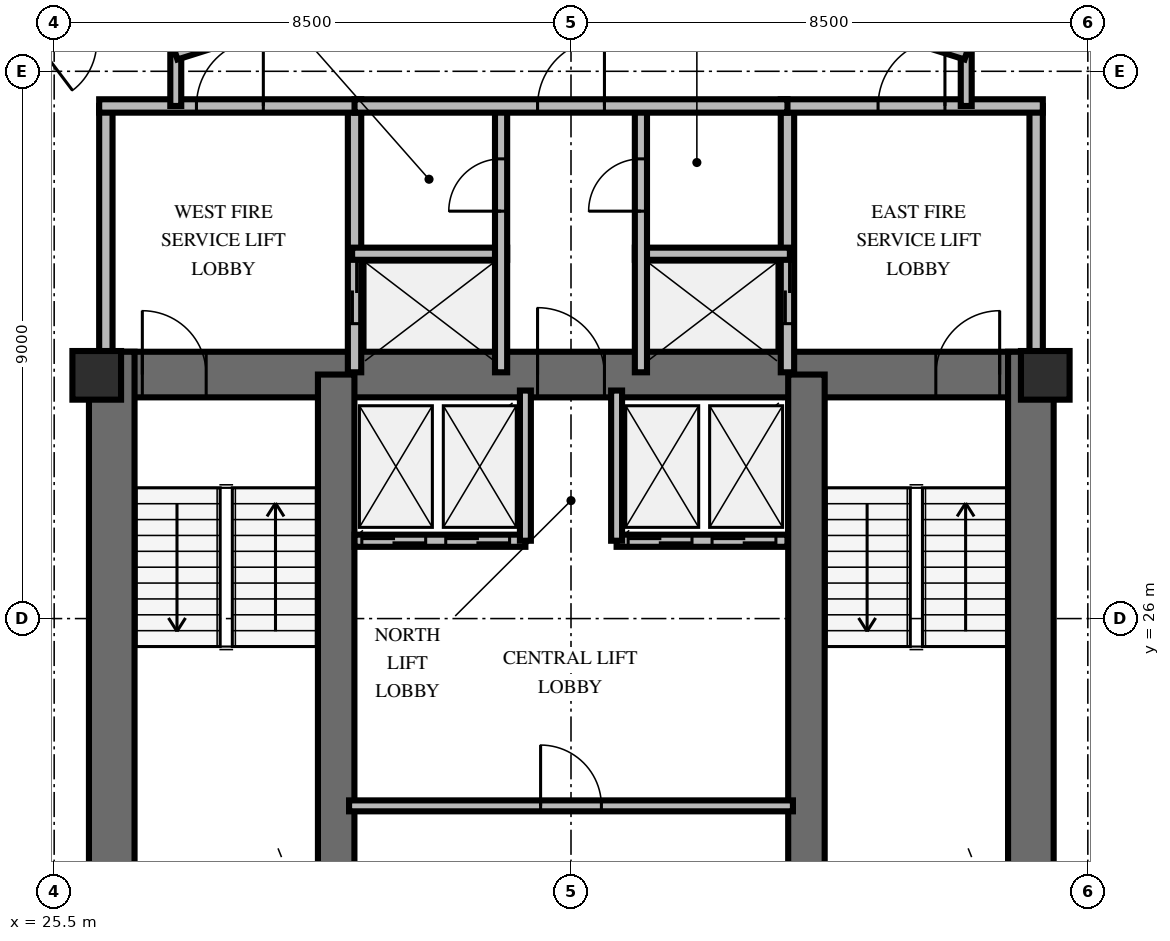
"""IFC4 building model, lengths in metres.
Left out: names, types, materials, properties, quantities, classifications, styles, units other than length and angle.
Written with IfcOpenShell. Run it as: python <this file> out.ifc"""

import sys

from ifc_helpers import new_model, si_unit, direction, frame, frame_2d, origin, origin_2d, place, context, subcontext, project, spatial, rectangle, extrude, element, fill, save


model = new_model("IFC4")
c1 = context("Model", 3, precision=1e-05, world=origin(), true_north=direction((0.0, 1.0)))
c2 = subcontext(c1, "Body", "Model", "MODEL_VIEW")
j1 = project(units=[si_unit("LENGTHUNIT", "METRE"), si_unit("PLANEANGLEUNIT", "RADIAN")], contexts=[c1])
p1 = place(None, origin())
s1 = spatial("IfcSite", under=j1, at=p1, CompositionType="ELEMENT")
p2 = place(p1, origin())
s2 = spatial("IfcBuilding", under=s1, at=p2, CompositionType="ELEMENT")
p3 = place(p2, frame((0.0, 0.0, 188.0)))
s3 = spatial("IfcBuildingStorey", under=s2, at=p3, CompositionType="ELEMENT", Elevation=188.0)
p4 = place(p3, frame((26.072, 30.013, 0.0), z_axis=(0.0, 0.0, 1.0), x_axis=(1.0, 0.0, 0.0)))
e1 = element("IfcWall", 1, at=p4, inside=s3, PredefinedType="SHEAR", context=c2, shape_type="SweptSolid", body=[
    extrude(rectangle(XDim=15.866, YDim=0.75, at=frame_2d((7.933, 0.0))), origin(), (0.0, 0.0, 1.0), 3.6),
])
p5 = place(p4, frame((0.878, 0.0, 0.0)))
e2 = element("IfcOpeningElement", 2, at=p5, cuts=e1, PredefinedType="OPENING", context=c2, shape_type="SweptSolid", body=[
    extrude(rectangle(XDim=1.05, YDim=2.15, at=frame_2d((0.525, 1.075))), frame((0.0, 0.385, 0.0), z_axis=(0.0, -1.0, 0.0), x_axis=(1.0, 0.0, 0.0)), (0.0, 0.0, 1.0), 0.77),
])
p6 = place(p4, frame((13.928, 0.0, 0.0)))
e3 = element("IfcOpeningElement", 3, at=p6, cuts=e1, PredefinedType="OPENING", context=c2, shape_type="SweptSolid", body=[
    extrude(rectangle(XDim=1.05, YDim=2.15, at=frame_2d((0.525, 1.075))), frame((0.0, 0.385, 0.0), z_axis=(0.0, -1.0, 0.0), x_axis=(1.0, 0.0, 0.0)), (0.0, 0.0, 1.0), 0.77),
])
p7 = place(p4, frame((7.378, 0.0, 0.0)))
e4 = element("IfcOpeningElement", 4, at=p7, cuts=e1, PredefinedType="OPENING", context=c2, shape_type="SweptSolid", body=[
    extrude(rectangle(XDim=1.1, YDim=2.15, at=frame_2d((0.55, 1.075))), frame((0.0, 0.385, 0.0), z_axis=(0.0, -1.0, 0.0), x_axis=(1.0, 0.0, 0.0)), (0.0, 0.0, 1.0), 0.77),
])
for number, where, z_axis, x_axis in (
    (5, (26.447, 19.812, 0.0), (0.0, 0.0, 1.0), (0.0, 1.0, 0.0)),
    (6, (41.563, 19.812, 0.0), (0.0, 0.0, 1.0), (0.0, 1.0, 0.0)),
):
    element("IfcWall", number, at=place(p3, frame(where, z_axis=z_axis, x_axis=x_axis)), inside=s3, PredefinedType="SHEAR", context=c2, shape_type="SweptSolid", body=[
        extrude(rectangle(XDim=10.576, YDim=0.75, at=frame_2d((5.288, 0.0))), origin(), (0.0, 0.0, 1.0), 3.6),
    ])
for number, where, z_axis, x_axis in (
    (7, (30.138, 20.187, 0.0), (0.0, 0.0, 1.0), (0.0, 1.0, 0.0)),
    (8, (37.872, 20.187, 0.0), (0.0, 0.0, 1.0), (0.0, 1.0, 0.0)),
):
    element("IfcWall", number, at=place(p3, frame(where, z_axis=z_axis, x_axis=x_axis)), inside=s3, PredefinedType="SHEAR", context=c2, shape_type="SweptSolid", body=[
        extrude(rectangle(XDim=9.826, YDim=0.6, at=frame_2d((4.913, 0.0))), origin(), (0.0, 0.0, 1.0), 3.6),
    ])
for number, where, z_axis, x_axis in (
    (9, (26.2, 30.0, 0.0), (0.0, 0.0, 1.0), (1.0, 0.0, 0.0)),
    (10, (41.8, 30.0, 0.0), (0.0, 0.0, 1.0), (1.0, 0.0, 0.0)),
):
    element("IfcColumn", number, at=place(p3, frame(where, z_axis=z_axis, x_axis=x_axis)), inside=s3, PredefinedType="PILASTER", context=c2, shape_type="SweptSolid", body=[
        extrude(rectangle(XDim=0.8, YDim=0.8, at=origin_2d()), origin(), (0.0, 0.0, 1.0), 3.6),
    ])
p8 = place(p3, frame((26.35, 30.05, 0.0), z_axis=(0.0, 0.0, 1.0), x_axis=(0.0, 1.0, 0.0)))
e11 = element("IfcWall", 11, at=p8, inside=s3, PredefinedType="SOLIDWALL", context=c2, shape_type="SweptSolid", body=[
    extrude(rectangle(XDim=4.38, YDim=0.22, at=frame_2d((2.19, 0.0))), origin(), (0.0, 0.0, 1.0), 2.46),
])
p9 = place(p3, frame((30.44, 30.05, 0.0), z_axis=(0.0, 0.0, 1.0), x_axis=(0.0, 1.0, 0.0)))
e12 = element("IfcWall", 12, at=p9, inside=s3, PredefinedType="SOLIDWALL", context=c2, shape_type="SweptSolid", body=[
    extrude(rectangle(XDim=4.38, YDim=0.22, at=frame_2d((2.19, 0.0))), origin(), (0.0, 0.0, 1.0), 2.46),
])
p10 = place(p9, frame((0.8, 0.0, 0.0)))
e13 = element("IfcOpeningElement", 13, at=p10, cuts=e12, PredefinedType="OPENING", context=c2, shape_type="SweptSolid", body=[
    extrude(rectangle(XDim=1.05, YDim=2.1, at=frame_2d((0.525, 1.05))), frame((0.0, 0.12, 0.0), z_axis=(0.0, -1.0, 0.0), x_axis=(1.0, 0.0, 0.0)), (0.0, 0.0, 1.0), 0.24),
])
p11 = place(p3, frame((26.24, 34.43, 0.0), z_axis=(0.0, 0.0, 1.0), x_axis=(1.0, 0.0, 0.0)))
e14 = element("IfcWall", 14, at=p11, inside=s3, PredefinedType="SOLIDWALL", context=c2, shape_type="SweptSolid", body=[
    extrude(rectangle(XDim=4.31, YDim=0.22, at=frame_2d((2.155, 0.0))), origin(), (0.0, 0.0, 1.0), 2.46),
])
p12 = place(p11, frame((1.6, 0.0, 0.0)))
e15 = element("IfcOpeningElement", 15, at=p12, cuts=e14, PredefinedType="OPENING", context=c2, shape_type="SweptSolid", body=[
    extrude(rectangle(XDim=1.1, YDim=2.15, at=frame_2d((0.55, 1.075))), frame((0.0, 0.12, 0.0), z_axis=(0.0, -1.0, 0.0), x_axis=(1.0, 0.0, 0.0)), (0.0, 0.0, 1.0), 0.24),
])
p13 = place(p3, frame((30.4, 32.0, 0.0), z_axis=(0.0, 0.0, 1.0), x_axis=(1.0, 0.0, 0.0)))
e16 = element("IfcWall", 16, at=p13, inside=s3, PredefinedType="SOLIDWALL", context=c2, shape_type="SweptSolid", body=[
    extrude(rectangle(XDim=2.55, YDim=0.2, at=frame_2d((1.275, 0.0))), origin(), (0.0, 0.0, 1.0), 2.46),
])
p14 = place(p3, frame((32.85, 30.05, 0.0), z_axis=(0.0, 0.0, 1.0), x_axis=(0.0, 1.0, 0.0)))
e17 = element("IfcWall", 17, at=p14, inside=s3, PredefinedType="SOLIDWALL", context=c2, shape_type="SweptSolid", body=[
    extrude(rectangle(XDim=4.38, YDim=0.2, at=frame_2d((2.19, 0.0))), origin(), (0.0, 0.0, 1.0), 2.46),
])
p15 = place(p14, frame((2.65, 0.0, 0.0)))
e18 = element("IfcOpeningElement", 18, at=p15, cuts=e17, PredefinedType="OPENING", context=c2, shape_type="SweptSolid", body=[
    extrude(rectangle(XDim=0.86, YDim=2.05, at=frame_2d((0.43, 1.025))), frame((0.0, 0.11, 0.0), z_axis=(0.0, -1.0, 0.0), x_axis=(1.0, 0.0, 0.0)), (0.0, 0.0, 1.0), 0.22),
])
p16 = place(p3, frame((37.56, 30.05, 0.0), z_axis=(0.0, 0.0, 1.0), x_axis=(0.0, 1.0, 0.0)))
e19 = element("IfcWall", 19, at=p16, inside=s3, PredefinedType="SOLIDWALL", context=c2, shape_type="SweptSolid", body=[
    extrude(rectangle(XDim=4.38, YDim=0.22, at=frame_2d((2.19, 0.0))), origin(), (0.0, 0.0, 1.0), 2.46),
])
p17 = place(p16, frame((0.8, 0.0, 0.0)))
e20 = element("IfcOpeningElement", 20, at=p17, cuts=e19, PredefinedType="OPENING", context=c2, shape_type="SweptSolid", body=[
    extrude(rectangle(XDim=1.05, YDim=2.1, at=frame_2d((0.525, 1.05))), frame((0.0, 0.12, 0.0), z_axis=(0.0, -1.0, 0.0), x_axis=(1.0, 0.0, 0.0)), (0.0, 0.0, 1.0), 0.24),
])
p18 = place(p3, frame((41.65, 30.05, 0.0), z_axis=(0.0, 0.0, 1.0), x_axis=(0.0, 1.0, 0.0)))
e21 = element("IfcWall", 21, at=p18, inside=s3, PredefinedType="SOLIDWALL", context=c2, shape_type="SweptSolid", body=[
    extrude(rectangle(XDim=4.38, YDim=0.22, at=frame_2d((2.19, 0.0))), origin(), (0.0, 0.0, 1.0), 2.46),
])
p19 = place(p3, frame((37.45, 34.43, 0.0), z_axis=(0.0, 0.0, 1.0), x_axis=(1.0, 0.0, 0.0)))
e22 = element("IfcWall", 22, at=p19, inside=s3, PredefinedType="SOLIDWALL", context=c2, shape_type="SweptSolid", body=[
    extrude(rectangle(XDim=4.31, YDim=0.22, at=frame_2d((2.155, 0.0))), origin(), (0.0, 0.0, 1.0), 2.46),
])
p20 = place(p19, frame((1.6, 0.0, 0.0)))
e23 = element("IfcOpeningElement", 23, at=p20, cuts=e22, PredefinedType="OPENING", context=c2, shape_type="SweptSolid", body=[
    extrude(rectangle(XDim=1.1, YDim=2.15, at=frame_2d((0.55, 1.075))), frame((0.0, 0.12, 0.0), z_axis=(0.0, -1.0, 0.0), x_axis=(1.0, 0.0, 0.0)), (0.0, 0.0, 1.0), 0.24),
])
p21 = place(p3, frame((35.05, 32.0, 0.0), z_axis=(0.0, 0.0, 1.0), x_axis=(1.0, 0.0, 0.0)))
e24 = element("IfcWall", 24, at=p21, inside=s3, PredefinedType="SOLIDWALL", context=c2, shape_type="SweptSolid", body=[
    extrude(rectangle(XDim=2.55, YDim=0.2, at=frame_2d((1.275, 0.0))), origin(), (0.0, 0.0, 1.0), 2.46),
])
p22 = place(p3, frame((35.15, 30.05, 0.0), z_axis=(0.0, 0.0, 1.0), x_axis=(0.0, 1.0, 0.0)))
e25 = element("IfcWall", 25, at=p22, inside=s3, PredefinedType="SOLIDWALL", context=c2, shape_type="SweptSolid", body=[
    extrude(rectangle(XDim=4.38, YDim=0.2, at=frame_2d((2.19, 0.0))), origin(), (0.0, 0.0, 1.0), 2.46),
])
p23 = place(p22, frame((2.65, 0.0, 0.0)))
e26 = element("IfcOpeningElement", 26, at=p23, cuts=e25, PredefinedType="OPENING", context=c2, shape_type="SweptSolid", body=[
    extrude(rectangle(XDim=0.86, YDim=2.05, at=frame_2d((0.43, 1.025))), frame((0.0, 0.11, 0.0), z_axis=(0.0, -1.0, 0.0), x_axis=(1.0, 0.0, 0.0)), (0.0, 0.0, 1.0), 0.22),
])
p24 = place(p3, frame((30.44, 34.43, 0.0), z_axis=(0.0, 0.0, 1.0), x_axis=(1.0, 0.0, 0.0)))
e27 = element("IfcWall", 27, at=p24, inside=s3, PredefinedType="SOLIDWALL", context=c2, shape_type="SweptSolid", body=[
    extrude(rectangle(XDim=7.12, YDim=0.22, at=frame_2d((3.56, 0.0))), origin(), (0.0, 0.0, 1.0), 2.46),
])
p25 = place(p24, frame((3.01, 0.0, 0.0)))
e28 = element("IfcOpeningElement", 28, at=p25, cuts=e27, PredefinedType="OPENING", context=c2, shape_type="SweptSolid", body=[
    extrude(rectangle(XDim=1.1, YDim=2.15, at=frame_2d((0.55, 1.075))), frame((0.0, 0.12, 0.0), z_axis=(0.0, -1.0, 0.0), x_axis=(1.0, 0.0, 0.0)), (0.0, 0.0, 1.0), 0.24),
])
p26 = place(p3, frame((30.35, 22.92, 0.0), z_axis=(0.0, 0.0, 1.0), x_axis=(1.0, 0.0, 0.0)))
e29 = element("IfcWall", 29, at=p26, inside=s3, PredefinedType="PARTITIONING", context=c2, shape_type="SweptSolid", body=[
    extrude(rectangle(XDim=7.3, YDim=0.18, at=frame_2d((3.65, 0.0))), origin(), (0.0, 0.0, 1.0), 2.46),
])
p27 = place(p26, frame((3.15, 0.0, 0.0)))
e30 = element("IfcOpeningElement", 30, at=p27, cuts=e29, PredefinedType="OPENING", context=c2, shape_type="SweptSolid", body=[
    extrude(rectangle(XDim=1.0, YDim=2.15, at=frame_2d((0.5, 1.075))), frame((0.0, 0.1, 0.0), z_axis=(0.0, -1.0, 0.0), x_axis=(1.0, 0.0, 0.0)), (0.0, 0.0, 1.0), 0.2),
])
p28 = place(p3, frame((30.44, 27.28, 0.0), z_axis=(0.0, 0.0, 1.0), x_axis=(1.0, 0.0, 0.0)))
e31 = element("IfcWall", 31, at=p28, inside=s3, PredefinedType="SOLIDWALL", context=c2, shape_type="SweptSolid", body=[
    extrude(rectangle(XDim=2.81, YDim=0.2, at=frame_2d((1.405, 0.0))), origin(), (0.0, 0.0, 1.0), 2.46),
])
p29 = place(p28, frame((0.12, 0.0, 0.0)))
e32 = element("IfcOpeningElement", 32, at=p29, cuts=e31, PredefinedType="OPENING", context=c2, shape_type="SweptSolid", body=[
    extrude(rectangle(XDim=1.05, YDim=2.1, at=frame_2d((0.525, 1.05))), frame((0.0, 0.11, 0.0), z_axis=(0.0, -1.0, 0.0), x_axis=(1.0, 0.0, 0.0)), (0.0, 0.0, 1.0), 0.22),
])
p30 = place(p28, frame((1.5, 0.0, 0.0)))
e33 = element("IfcOpeningElement", 33, at=p30, cuts=e31, PredefinedType="OPENING", context=c2, shape_type="SweptSolid", body=[
    extrude(rectangle(XDim=1.05, YDim=2.1, at=frame_2d((0.525, 1.05))), frame((0.0, 0.11, 0.0), z_axis=(0.0, -1.0, 0.0), x_axis=(1.0, 0.0, 0.0)), (0.0, 0.0, 1.0), 0.22),
])
p31 = place(p3, frame((33.25, 27.28, 0.0), z_axis=(0.0, 0.0, 1.0), x_axis=(0.0, 1.0, 0.0)))
e34 = element("IfcWall", 34, at=p31, inside=s3, PredefinedType="SOLIDWALL", context=c2, shape_type="SweptSolid", body=[
    extrude(rectangle(XDim=2.47, YDim=0.18, at=frame_2d((1.235, 0.0))), origin(), (0.0, 0.0, 1.0), 2.46),
])
p32 = place(p3, frame((34.75, 27.28, 0.0), z_axis=(0.0, 0.0, 1.0), x_axis=(1.0, 0.0, 0.0)))
e35 = element("IfcWall", 35, at=p32, inside=s3, PredefinedType="SOLIDWALL", context=c2, shape_type="SweptSolid", body=[
    extrude(rectangle(XDim=2.81, YDim=0.2, at=frame_2d((1.405, 0.0))), origin(), (0.0, 0.0, 1.0), 2.46),
])
p33 = place(p32, frame((0.19, 0.0, 0.0)))
e36 = element("IfcOpeningElement", 36, at=p33, cuts=e35, PredefinedType="OPENING", context=c2, shape_type="SweptSolid", body=[
    extrude(rectangle(XDim=1.05, YDim=2.1, at=frame_2d((0.525, 1.05))), frame((0.0, 0.11, 0.0), z_axis=(0.0, -1.0, 0.0), x_axis=(1.0, 0.0, 0.0)), (0.0, 0.0, 1.0), 0.22),
])
p34 = place(p32, frame((1.57, 0.0, 0.0)))
e37 = element("IfcOpeningElement", 37, at=p34, cuts=e35, PredefinedType="OPENING", context=c2, shape_type="SweptSolid", body=[
    extrude(rectangle(XDim=1.05, YDim=2.1, at=frame_2d((0.525, 1.05))), frame((0.0, 0.11, 0.0), z_axis=(0.0, -1.0, 0.0), x_axis=(1.0, 0.0, 0.0)), (0.0, 0.0, 1.0), 0.22),
])
p35 = place(p3, frame((34.75, 27.28, 0.0), z_axis=(0.0, 0.0, 1.0), x_axis=(0.0, 1.0, 0.0)))
e38 = element("IfcWall", 38, at=p35, inside=s3, PredefinedType="SOLIDWALL", context=c2, shape_type="SweptSolid", body=[
    extrude(rectangle(XDim=2.47, YDim=0.18, at=frame_2d((1.235, 0.0))), origin(), (0.0, 0.0, 1.0), 2.46),
])
for number, where, z_axis, x_axis in (
    (39, (27.5, 34.43, 0.0), (0.0, 0.0, 1.0), (0.0, 1.0, 0.0)),
    (40, (40.5, 35.28, 0.0), (0.0, 0.0, 1.0), (0.0, -1.0, 0.0)),
):
    element("IfcWall", number, at=place(p3, frame(where, z_axis=z_axis, x_axis=x_axis)), inside=s3, PredefinedType="PARTITIONING", context=c2, shape_type="SweptSolid", body=[
        extrude(rectangle(XDim=0.85, YDim=0.18, at=frame_2d((0.425, 0.0))), origin(), (0.0, 0.0, 1.0), 2.46),
    ])
p36 = place(p3, frame((27.5, 35.28, 0.0), z_axis=(0.0, 0.0, 1.0), x_axis=(0.953691418528, 0.300786765376, 0.0)))
e41 = element("IfcWall", 41, at=p36, inside=s3, PredefinedType="PARTITIONING", context=c2, shape_type="SweptSolid", body=[
    extrude(rectangle(XDim=6.816, YDim=0.18, at=frame_2d((3.408, 0.0))), origin(), (0.0, 0.0, 1.0), 2.46),
])
p37 = place(p36, frame((2.858, 0.0, 0.0)))
e42 = element("IfcOpeningElement", 42, at=p37, cuts=e41, PredefinedType="OPENING", context=c2, shape_type="SweptSolid", body=[
    extrude(rectangle(XDim=1.1, YDim=2.15, at=frame_2d((0.55, 1.075))), frame((0.0, 0.1, 0.0), z_axis=(0.0, -1.0, 0.0), x_axis=(1.0, 0.0, 0.0)), (0.0, 0.0, 1.0), 0.2),
])
p38 = place(p3, frame((34.0, 37.33, 0.0), z_axis=(0.0, 0.0, 1.0), x_axis=(0.953691418528, -0.300786765376, 0.0)))
e43 = element("IfcWall", 43, at=p38, inside=s3, PredefinedType="PARTITIONING", context=c2, shape_type="SweptSolid", body=[
    extrude(rectangle(XDim=6.816, YDim=0.18, at=frame_2d((3.408, 0.0))), origin(), (0.0, 0.0, 1.0), 2.46),
])
p39 = place(p38, frame((2.858, 0.0, 0.0)))
e44 = element("IfcOpeningElement", 44, at=p39, cuts=e43, PredefinedType="OPENING", context=c2, shape_type="SweptSolid", body=[
    extrude(rectangle(XDim=1.1, YDim=2.15, at=frame_2d((0.55, 1.075))), frame((0.0, 0.1, 0.0), z_axis=(0.0, -1.0, 0.0), x_axis=(1.0, 0.0, 0.0)), (0.0, 0.0, 1.0), 0.2),
])
p40 = place(p3, frame((44.431, 33.875, 0.0), z_axis=(0.0, 0.0, 1.0), x_axis=(-0.731959643507, 0.681347987652, 0.0)))
e45 = element("IfcWall", 45, at=p40, inside=s3, PredefinedType="PARTITIONING", context=c2, shape_type="SweptSolid", body=[
    extrude(rectangle(XDim=4.539, YDim=0.18, at=frame_2d((2.27, 0.0))), origin(), (0.0, 0.0, 1.0), 2.46),
])
p41 = place(p3, frame((28.056, 37.64, 0.0), z_axis=(0.0, 0.0, 1.0), x_axis=(-0.798117902905, -0.602501297146, 0.0)))
e46 = element("IfcWall", 46, at=p41, inside=s3, PredefinedType="PARTITIONING", context=c2, shape_type="SweptSolid", body=[
    extrude(rectangle(XDim=4.539, YDim=0.18, at=frame_2d((2.27, 0.0))), origin(), (0.0, 0.0, 1.0), 2.46),
])
p42 = place(p41, frame((2.579, 0.0, 0.0)))
e47 = element("IfcOpeningElement", 47, at=p42, cuts=e46, PredefinedType="OPENING", context=c2, shape_type="SweptSolid", body=[
    extrude(rectangle(XDim=1.0, YDim=2.15, at=frame_2d((0.5, 1.075))), frame((0.0, 0.1, 0.0), z_axis=(0.0, -1.0, 0.0), x_axis=(1.0, 0.0, 0.0)), (0.0, 0.0, 1.0), 0.2),
])
p43 = place(p5, origin())
e48 = element("IfcDoor", 48, at=p43, inside=s3, OperationType="SINGLE_SWING_LEFT", PredefinedType="DOOR", context=c2, shape_type="SweptSolid", body=[
    extrude(rectangle(XDim=1.05, YDim=2.15, at=frame_2d((0.525, 1.075))), frame((0.0, 0.025, 0.0), z_axis=(0.0, -1.0, 0.0), x_axis=(1.0, 0.0, 0.0)), (0.0, 0.0, 1.0), 0.05),
])
fill(e2, e48)
p44 = place(p6, origin())
e49 = element("IfcDoor", 49, at=p44, inside=s3, OperationType="SINGLE_SWING_RIGHT", PredefinedType="DOOR", context=c2, shape_type="SweptSolid", body=[
    extrude(rectangle(XDim=1.05, YDim=2.15, at=frame_2d((0.525, 1.075))), frame((0.0, 0.025, 0.0), z_axis=(0.0, -1.0, 0.0), x_axis=(1.0, 0.0, 0.0)), (0.0, 0.0, 1.0), 0.05),
])
fill(e3, e49)
p45 = place(p7, origin())
e50 = element("IfcDoor", 50, at=p45, inside=s3, OperationType="SINGLE_SWING_LEFT", PredefinedType="DOOR", context=c2, shape_type="SweptSolid", body=[
    extrude(rectangle(XDim=1.1, YDim=2.15, at=frame_2d((0.55, 1.075))), frame((0.0, 0.025, 0.0), z_axis=(0.0, -1.0, 0.0), x_axis=(1.0, 0.0, 0.0)), (0.0, 0.0, 1.0), 0.05),
])
fill(e4, e50)
p46 = place(p12, origin())
e51 = element("IfcDoor", 51, at=p46, inside=s3, OperationType="SINGLE_SWING_RIGHT", PredefinedType="DOOR", context=c2, shape_type="SweptSolid", body=[
    extrude(rectangle(XDim=1.1, YDim=2.15, at=frame_2d((0.55, 1.075))), frame((0.0, 0.025, 0.0), z_axis=(0.0, -1.0, 0.0), x_axis=(1.0, 0.0, 0.0)), (0.0, 0.0, 1.0), 0.05),
])
fill(e15, e51)
p47 = place(p10, origin())
e52 = element("IfcDoor", 52, at=p47, inside=s3, OperationType="DOUBLE_DOOR_SLIDING", PredefinedType="USERDEFINED", context=c2, shape_type="SweptSolid", body=[
    extrude(rectangle(XDim=1.05, YDim=2.1, at=frame_2d((0.525, 1.05))), frame((0.0, 0.025, 0.0), z_axis=(0.0, -1.0, 0.0), x_axis=(1.0, 0.0, 0.0)), (0.0, 0.0, 1.0), 0.05),
])
fill(e13, e52)
p48 = place(p15, origin())
e53 = element("IfcDoor", 53, at=p48, inside=s3, OperationType="SINGLE_SWING_LEFT", PredefinedType="TRAPDOOR", context=c2, shape_type="SweptSolid", body=[
    extrude(rectangle(XDim=0.86, YDim=2.05, at=frame_2d((0.43, 1.025))), frame((0.0, 0.025, 0.0), z_axis=(0.0, -1.0, 0.0), x_axis=(1.0, 0.0, 0.0)), (0.0, 0.0, 1.0), 0.05),
])
fill(e18, e53)
p49 = place(p20, origin())
e54 = element("IfcDoor", 54, at=p49, inside=s3, OperationType="SINGLE_SWING_RIGHT", PredefinedType="DOOR", context=c2, shape_type="SweptSolid", body=[
    extrude(rectangle(XDim=1.1, YDim=2.15, at=frame_2d((0.55, 1.075))), frame((0.0, 0.025, 0.0), z_axis=(0.0, -1.0, 0.0), x_axis=(1.0, 0.0, 0.0)), (0.0, 0.0, 1.0), 0.05),
])
fill(e23, e54)
p50 = place(p17, origin())
e55 = element("IfcDoor", 55, at=p50, inside=s3, OperationType="DOUBLE_DOOR_SLIDING", PredefinedType="USERDEFINED", context=c2, shape_type="SweptSolid", body=[
    extrude(rectangle(XDim=1.05, YDim=2.1, at=frame_2d((0.525, 1.05))), frame((0.0, 0.025, 0.0), z_axis=(0.0, -1.0, 0.0), x_axis=(1.0, 0.0, 0.0)), (0.0, 0.0, 1.0), 0.05),
])
fill(e20, e55)
p51 = place(p23, origin())
e56 = element("IfcDoor", 56, at=p51, inside=s3, OperationType="SINGLE_SWING_LEFT", PredefinedType="TRAPDOOR", context=c2, shape_type="SweptSolid", body=[
    extrude(rectangle(XDim=0.86, YDim=2.05, at=frame_2d((0.43, 1.025))), frame((0.0, 0.025, 0.0), z_axis=(0.0, -1.0, 0.0), x_axis=(1.0, 0.0, 0.0)), (0.0, 0.0, 1.0), 0.05),
])
fill(e26, e56)
p52 = place(p25, origin())
e57 = element("IfcDoor", 57, at=p52, inside=s3, OperationType="SINGLE_SWING_RIGHT", PredefinedType="DOOR", context=c2, shape_type="SweptSolid", body=[
    extrude(rectangle(XDim=1.1, YDim=2.15, at=frame_2d((0.55, 1.075))), frame((0.0, 0.025, 0.0), z_axis=(0.0, -1.0, 0.0), x_axis=(1.0, 0.0, 0.0)), (0.0, 0.0, 1.0), 0.05),
])
fill(e28, e57)
p53 = place(p27, origin())
e58 = element("IfcDoor", 58, at=p53, inside=s3, OperationType="SINGLE_SWING_LEFT", PredefinedType="DOOR", context=c2, shape_type="SweptSolid", body=[
    extrude(rectangle(XDim=1.0, YDim=2.15, at=frame_2d((0.5, 1.075))), frame((0.0, 0.025, 0.0), z_axis=(0.0, -1.0, 0.0), x_axis=(1.0, 0.0, 0.0)), (0.0, 0.0, 1.0), 0.05),
])
fill(e30, e58)
p54 = place(p29, origin())
e59 = element("IfcDoor", 59, at=p54, inside=s3, OperationType="DOUBLE_DOOR_SLIDING", PredefinedType="USERDEFINED", context=c2, shape_type="SweptSolid", body=[
    extrude(rectangle(XDim=1.05, YDim=2.1, at=frame_2d((0.525, 1.05))), frame((0.0, 0.025, 0.0), z_axis=(0.0, -1.0, 0.0), x_axis=(1.0, 0.0, 0.0)), (0.0, 0.0, 1.0), 0.05),
])
fill(e32, e59)
p55 = place(p30, origin())
e60 = element("IfcDoor", 60, at=p55, inside=s3, OperationType="DOUBLE_DOOR_SLIDING", PredefinedType="USERDEFINED", context=c2, shape_type="SweptSolid", body=[
    extrude(rectangle(XDim=1.05, YDim=2.1, at=frame_2d((0.525, 1.05))), frame((0.0, 0.025, 0.0), z_axis=(0.0, -1.0, 0.0), x_axis=(1.0, 0.0, 0.0)), (0.0, 0.0, 1.0), 0.05),
])
fill(e33, e60)
p56 = place(p33, origin())
e61 = element("IfcDoor", 61, at=p56, inside=s3, OperationType="DOUBLE_DOOR_SLIDING", PredefinedType="USERDEFINED", context=c2, shape_type="SweptSolid", body=[
    extrude(rectangle(XDim=1.05, YDim=2.1, at=frame_2d((0.525, 1.05))), frame((0.0, 0.025, 0.0), z_axis=(0.0, -1.0, 0.0), x_axis=(1.0, 0.0, 0.0)), (0.0, 0.0, 1.0), 0.05),
])
fill(e36, e61)
p57 = place(p34, origin())
e62 = element("IfcDoor", 62, at=p57, inside=s3, OperationType="DOUBLE_DOOR_SLIDING", PredefinedType="USERDEFINED", context=c2, shape_type="SweptSolid", body=[
    extrude(rectangle(XDim=1.05, YDim=2.1, at=frame_2d((0.525, 1.05))), frame((0.0, 0.025, 0.0), z_axis=(0.0, -1.0, 0.0), x_axis=(1.0, 0.0, 0.0)), (0.0, 0.0, 1.0), 0.05),
])
fill(e37, e62)
save(model, sys.argv[1])
